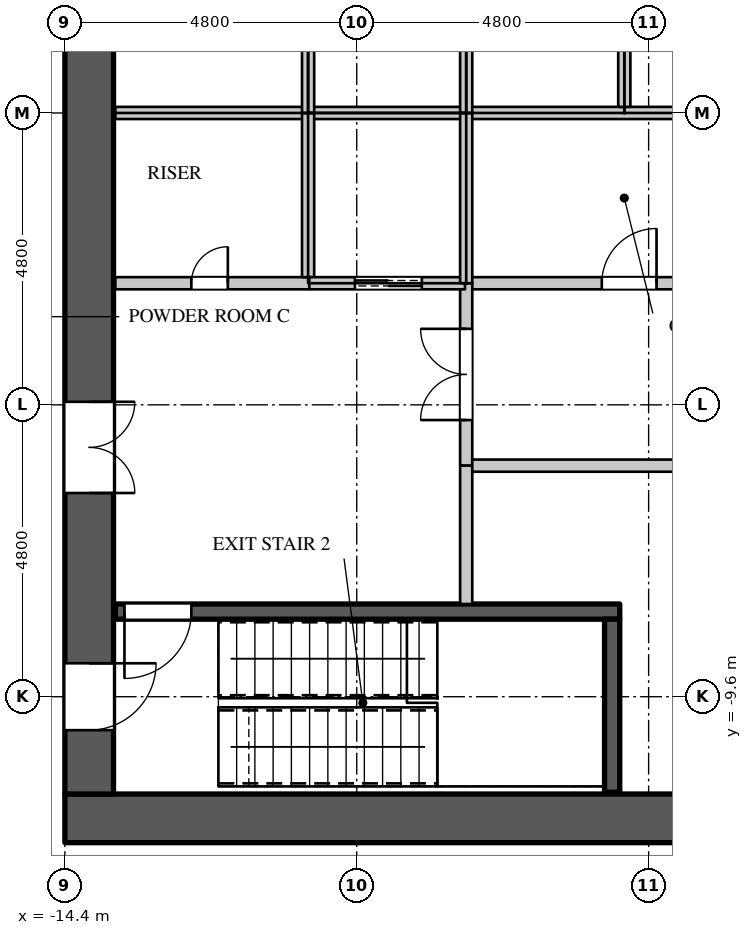
"""IFC4 building model, lengths in metres.
Left out: names, types, materials, properties, quantities, classifications, styles, units other than length and angle.
Written with IfcOpenShell. Run it as: python <this file> out.ifc"""

import sys

from ifc_helpers import new_model, si_unit, direction, frame, frame_2d, origin, place, context, subcontext, project, spatial, rectangle, extrude, element, fill, save


model = new_model("IFC4")
c1 = context("Model", 3, precision=1e-05, world=origin(), true_north=direction((0.0, 1.0)))
c2 = subcontext(c1, "Body", "Model", "MODEL_VIEW")
j1 = project(units=[si_unit("LENGTHUNIT", "METRE"), si_unit("PLANEANGLEUNIT", "RADIAN")], contexts=[c1])
p1 = place(None, origin())
s1 = spatial("IfcSite", under=j1, at=p1, CompositionType="ELEMENT")
p2 = place(p1, origin())
s2 = spatial("IfcBuilding", under=s1, at=p2, CompositionType="ELEMENT")
p3 = place(p2, frame((0.0, 0.0, 148.5)))
s3 = spatial("IfcBuildingStorey", under=s2, at=p3, CompositionType="ELEMENT", Elevation=148.5)
p4 = place(p3, frame((-14.4, -11.6, 0.0), z_axis=(0.0, 0.0, 1.0), x_axis=(1.0, 0.0, 0.0)))
e1 = element("IfcWall", 1, at=p4, inside=s3, PredefinedType="SHEAR", context=c2, shape_type="SweptSolid", body=[
    extrude(rectangle(XDim=28.8, YDim=0.8, at=frame_2d((14.4, 0.0))), origin(), (0.0, 0.0, 1.0), 4.2),
])
p5 = place(p3, frame((-14.0, -11.2, 0.0), z_axis=(0.0, 0.0, 1.0), x_axis=(0.0, 1.0, 0.0)))
e2 = element("IfcWall", 2, at=p5, inside=s3, PredefinedType="SHEAR", context=c2, shape_type="SweptSolid", body=[
    extrude(rectangle(XDim=22.4, YDim=0.8, at=frame_2d((11.2, 0.0))), origin(), (0.0, 0.0, 1.0), 4.2),
])
p6 = place(p5, frame((20.25, 0.0, 0.0)))
e3 = element("IfcOpeningElement", 3, at=p6, cuts=e2, PredefinedType="OPENING", context=c2, shape_type="SweptSolid", body=[
    extrude(rectangle(XDim=1.1, YDim=2.2, at=frame_2d((0.55, 1.1))), frame((0.0, 0.41, 0.0), z_axis=(0.0, -1.0, 0.0), x_axis=(1.0, 0.0, 0.0)), (0.0, 0.0, 1.0), 0.82),
])
p7 = place(p5, frame((1.05, 0.0, 0.0)))
e4 = element("IfcOpeningElement", 4, at=p7, cuts=e2, PredefinedType="OPENING", context=c2, shape_type="SweptSolid", body=[
    extrude(rectangle(XDim=1.1, YDim=2.2, at=frame_2d((0.55, 1.1))), frame((0.0, 0.41, 0.0), z_axis=(0.0, -1.0, 0.0), x_axis=(1.0, 0.0, 0.0)), (0.0, 0.0, 1.0), 0.82),
])
p8 = place(p5, frame((15.95, 0.0, 0.0)))
e5 = element("IfcOpeningElement", 5, at=p8, cuts=e2, PredefinedType="OPENING", context=c2, shape_type="SweptSolid", body=[
    extrude(rectangle(XDim=1.5, YDim=2.4, at=frame_2d((0.75, 1.2))), frame((0.0, 0.41, 0.0), z_axis=(0.0, -1.0, 0.0), x_axis=(1.0, 0.0, 0.0)), (0.0, 0.0, 1.0), 0.82),
])
p9 = place(p5, frame((4.95, 0.0, 0.0)))
e6 = element("IfcOpeningElement", 6, at=p9, cuts=e2, PredefinedType="OPENING", context=c2, shape_type="SweptSolid", body=[
    extrude(rectangle(XDim=1.5, YDim=2.4, at=frame_2d((0.75, 1.2))), frame((0.0, 0.41, 0.0), z_axis=(0.0, -1.0, 0.0), x_axis=(1.0, 0.0, 0.0)), (0.0, 0.0, 1.0), 0.82),
])
p10 = place(p3, frame((-7.82, -2.8, 0.0), z_axis=(0.0, 0.0, 1.0), x_axis=(1.0, 0.0, 0.0)))
e7 = element("IfcWall", 7, at=p10, inside=s3, PredefinedType="PARTITIONING", context=c2, shape_type="SweptSolid", body=[
    extrude(rectangle(XDim=9.64, YDim=0.2, at=frame_2d((4.82, 0.0))), origin(), (0.0, 0.0, 1.0), 3.798),
])
p11 = place(p10, frame((2.25, 0.0, 0.0)))
e8 = element("IfcOpeningElement", 8, at=p11, cuts=e7, PredefinedType="OPENING", context=c2, shape_type="SweptSolid", body=[
    extrude(rectangle(XDim=0.9, YDim=2.2, at=frame_2d((0.45, 1.1))), frame((0.0, 0.11, 0.0), z_axis=(0.0, -1.0, 0.0), x_axis=(1.0, 0.0, 0.0)), (0.0, 0.0, 1.0), 0.22),
])
p12 = place(p10, frame((6.9, 0.0, 0.0)))
e9 = element("IfcOpeningElement", 9, at=p12, cuts=e7, PredefinedType="OPENING", context=c2, shape_type="SweptSolid", body=[
    extrude(rectangle(XDim=0.9, YDim=2.2, at=frame_2d((0.45, 1.1))), frame((0.0, 0.11, 0.0), z_axis=(0.0, -1.0, 0.0), x_axis=(1.0, 0.0, 0.0)), (0.0, 0.0, 1.0), 0.22),
])
p13 = place(p3, frame((-7.8, -5.8, 0.0), z_axis=(0.0, 0.0, 1.0), x_axis=(0.0, 1.0, 0.0)))
e10 = element("IfcWall", 10, at=p13, inside=s3, PredefinedType="PARTITIONING", context=c2, shape_type="SweptSolid", body=[
    extrude(rectangle(XDim=3.0, YDim=0.2, at=frame_2d((1.5, 0.0))), origin(), (0.0, 0.0, 1.0), 3.798),
])
p14 = place(p13, frame((0.75, 0.0, 0.0)))
e11 = element("IfcOpeningElement", 11, at=p14, cuts=e10, PredefinedType="OPENING", context=c2, shape_type="SweptSolid", body=[
    extrude(rectangle(XDim=1.5, YDim=2.4, at=frame_2d((0.75, 1.2))), frame((0.0, 0.11, 0.0), z_axis=(0.0, -1.0, 0.0), x_axis=(1.0, 0.0, 0.0)), (0.0, 0.0, 1.0), 0.22),
])
p15 = place(p3, frame((-13.57, -2.8, 0.0), z_axis=(0.0, 0.0, 1.0), x_axis=(1.0, 0.0, 0.0)))
e12 = element("IfcWall", 12, at=p15, inside=s3, PredefinedType="PARTITIONING", context=c2, shape_type="SweptSolid", body=[
    extrude(rectangle(XDim=3.19, YDim=0.2, at=frame_2d((1.595, 0.0))), origin(), (0.0, 0.0, 1.0), 3.798),
])
p16 = place(p15, frame((1.25, 0.0, 0.0)))
e13 = element("IfcOpeningElement", 13, at=p16, cuts=e12, PredefinedType="OPENING", context=c2, shape_type="SweptSolid", body=[
    extrude(rectangle(XDim=0.6, YDim=2.0, at=frame_2d((0.3, 1.0))), frame((0.0, 0.11, 0.0), z_axis=(0.0, -1.0, 0.0), x_axis=(1.0, 0.0, 0.0)), (0.0, 0.0, 1.0), 0.22),
])
p17 = place(p3, frame((-7.8, -8.075, 0.0), z_axis=(0.0, 0.0, 1.0), x_axis=(0.0, 1.0, 0.0)))
e14 = element("IfcWall", 14, at=p17, inside=s3, PredefinedType="PARTITIONING", context=c2, shape_type="SweptSolid", body=[
    extrude(rectangle(XDim=2.275, YDim=0.2, at=frame_2d((1.137, 0.0))), origin(), (0.0, 0.0, 1.0), 3.798),
])
p18 = place(p3, frame((-7.7, -5.8, 0.0), z_axis=(0.0, 0.0, 1.0), x_axis=(1.0, 0.0, 0.0)))
e15 = element("IfcWall", 15, at=p18, inside=s3, PredefinedType="PARTITIONING", context=c2, shape_type="SweptSolid", body=[
    extrude(rectangle(XDim=11.72, YDim=0.2, at=frame_2d((5.86, 0.0))), origin(), (0.0, 0.0, 1.0), 3.798),
])
p19 = place(p18, frame((5.4, 0.0, 0.0)))
e16 = element("IfcOpeningElement", 16, at=p19, cuts=e15, PredefinedType="OPENING", context=c2, shape_type="SweptSolid", body=[
    extrude(rectangle(XDim=0.9, YDim=2.2, at=frame_2d((0.45, 1.1))), frame((0.0, 0.11, 0.0), z_axis=(0.0, -1.0, 0.0), x_axis=(1.0, 0.0, 0.0)), (0.0, 0.0, 1.0), 0.22),
])
p20 = place(p3, frame((-13.57, 0.0, 0.0), z_axis=(0.0, 0.0, 1.0), x_axis=(1.0, 0.0, 0.0)))
e17 = element("IfcWall", 17, at=p20, inside=s3, PredefinedType="PARTITIONING", context=c2, shape_type="SweptSolid", body=[
    extrude(rectangle(XDim=23.97, YDim=0.2, at=frame_2d((11.985, 0.0))), origin(), (0.0, 0.0, 1.0), 3.798),
])
p21 = place(p3, frame((-10.4, -2.7, 0.0), z_axis=(0.0, 0.0, 1.0), x_axis=(0.0, 1.0, 0.0)))
e18 = element("IfcWall", 18, at=p21, inside=s3, PredefinedType="PARTITIONING", context=c2, shape_type="SweptSolid", body=[
    extrude(rectangle(XDim=2.7, YDim=0.2, at=frame_2d((1.35, 0.0))), origin(), (0.0, 0.0, 1.0), 3.798),
])
p22 = place(p3, frame((-10.38, -2.8, 0.0), z_axis=(0.0, 0.0, 1.0), x_axis=(1.0, 0.0, 0.0)))
e19 = element("IfcWall", 19, at=p22, inside=s3, PredefinedType="PARTITIONING", context=c2, shape_type="SweptSolid", body=[
    extrude(rectangle(XDim=2.56, YDim=0.2, at=frame_2d((1.28, 0.0))), origin(), (0.0, 0.0, 1.0), 3.798),
])
p23 = place(p22, frame((0.75, 0.0, 0.0)))
e20 = element("IfcOpeningElement", 20, at=p23, cuts=e19, PredefinedType="OPENING", context=c2, shape_type="SweptSolid", body=[
    extrude(rectangle(XDim=1.1, YDim=2.2, at=frame_2d((0.55, 1.1))), frame((0.0, 0.11, 0.0), z_axis=(0.0, -1.0, 0.0), x_axis=(1.0, 0.0, 0.0)), (0.0, 0.0, 1.0), 0.22),
])
p24 = place(p3, frame((-10.4, 0.0, 0.0), z_axis=(0.0, 0.0, 1.0), x_axis=(0.0, 1.0, 0.0)))
e21 = element("IfcWall", 21, at=p24, inside=s3, PredefinedType="PARTITIONING", context=c2, shape_type="SweptSolid", body=[
    extrude(rectangle(XDim=2.7, YDim=0.2, at=frame_2d((1.35, 0.0))), origin(), (0.0, 0.0, 1.0), 3.798),
])
for number, where, z_axis, x_axis in (
    (22, (-7.8, -2.8, 0.0), (0.0, 0.0, 1.0), (0.0, 1.0, 0.0)),
    (23, (-7.8, 0.0, 0.0), (0.0, 0.0, 1.0), (0.0, 1.0, 0.0)),
):
    element("IfcWall", number, at=place(p3, frame(where, z_axis=z_axis, x_axis=x_axis)), inside=s3, PredefinedType="PARTITIONING", context=c2, shape_type="SweptSolid", body=[
        extrude(rectangle(XDim=2.8, YDim=0.2, at=frame_2d((1.4, 0.0))), origin(), (0.0, 0.0, 1.0), 3.798),
    ])
p25 = place(p3, frame((-5.2, 0.1, 0.0), z_axis=(0.0, 0.0, 1.0), x_axis=(0.0, 1.0, 0.0)))
e24 = element("IfcWall", 24, at=p25, inside=s3, PredefinedType="PARTITIONING", context=c2, shape_type="SweptSolid", body=[
    extrude(rectangle(XDim=2.6, YDim=0.2, at=frame_2d((1.3, 0.0))), origin(), (0.0, 0.0, 1.0), 3.798),
])
p26 = place(p3, frame((-13.57, -8.2, 0.0), z_axis=(0.0, 0.0, 1.0), x_axis=(1.0, 0.0, 0.0)))
e25 = element("IfcWall", 25, at=p26, inside=s3, PredefinedType="SHEAR", context=c2, shape_type="SweptSolid", body=[
    extrude(rectangle(XDim=8.295, YDim=0.25, at=frame_2d((4.147, 0.0))), origin(), (0.0, 0.0, 1.0), 3.798),
])
p27 = place(p26, frame((0.15, 0.0, 0.0)))
e26 = element("IfcOpeningElement", 26, at=p27, cuts=e25, PredefinedType="OPENING", context=c2, shape_type="SweptSolid", body=[
    extrude(rectangle(XDim=1.1, YDim=2.2, at=frame_2d((0.55, 1.1))), frame((0.0, 0.135, 0.0), z_axis=(0.0, -1.0, 0.0), x_axis=(1.0, 0.0, 0.0)), (0.0, 0.0, 1.0), 0.27),
])
p28 = place(p3, frame((-5.4, -11.17, 0.0), z_axis=(0.0, 0.0, 1.0), x_axis=(0.0, 1.0, 0.0)))
e27 = element("IfcWall", 27, at=p28, inside=s3, PredefinedType="SHEAR", context=c2, shape_type="SweptSolid", body=[
    extrude(rectangle(XDim=2.845, YDim=0.25, at=frame_2d((1.422, 0.0))), origin(), (0.0, 0.0, 1.0), 3.798),
])
p29 = place(p16, origin())
e28 = element("IfcDoor", 28, at=p29, inside=s3, OperationType="SINGLE_SWING_RIGHT", PredefinedType="DOOR", context=c2, shape_type="SweptSolid", body=[
    extrude(rectangle(XDim=0.6, YDim=2.0, at=frame_2d((0.3, 1.0))), frame((0.0, 0.025, 0.0), z_axis=(0.0, -1.0, 0.0), x_axis=(1.0, 0.0, 0.0)), (0.0, 0.0, 1.0), 0.05),
])
fill(e13, e28)
p30 = place(p11, origin())
e29 = element("IfcDoor", 29, at=p30, inside=s3, OperationType="SINGLE_SWING_RIGHT", PredefinedType="DOOR", context=c2, shape_type="SweptSolid", body=[
    extrude(rectangle(XDim=0.9, YDim=2.2, at=frame_2d((0.45, 1.1))), frame((0.0, 0.025, 0.0), z_axis=(0.0, -1.0, 0.0), x_axis=(1.0, 0.0, 0.0)), (0.0, 0.0, 1.0), 0.05),
])
fill(e8, e29)
p31 = place(p23, origin())
e30 = element("IfcDoor", 30, at=p31, inside=s3, OperationType="DOUBLE_DOOR_SLIDING", PredefinedType="DOOR", context=c2, shape_type="SweptSolid", body=[
    extrude(rectangle(XDim=1.1, YDim=2.2, at=frame_2d((0.55, 1.1))), frame((0.0, 0.025, 0.0), z_axis=(0.0, -1.0, 0.0), x_axis=(1.0, 0.0, 0.0)), (0.0, 0.0, 1.0), 0.05),
])
fill(e20, e30)
p32 = place(p27, origin())
e31 = element("IfcDoor", 31, at=p32, inside=s3, OperationType="SINGLE_SWING_RIGHT", PredefinedType="DOOR", context=c2, shape_type="SweptSolid", body=[
    extrude(rectangle(XDim=1.1, YDim=2.2, at=frame_2d((0.55, 1.1))), frame((0.0, 0.025, 0.0), z_axis=(0.0, -1.0, 0.0), x_axis=(1.0, 0.0, 0.0)), (0.0, 0.0, 1.0), 0.05),
])
fill(e26, e31)
p33 = place(p14, origin())
e32 = element("IfcDoor", 32, at=p33, inside=s3, OperationType="DOUBLE_DOOR_SINGLE_SWING", PredefinedType="DOOR", context=c2, shape_type="SweptSolid", body=[
    extrude(rectangle(XDim=1.5, YDim=2.4, at=frame_2d((0.75, 1.2))), frame((0.0, 0.025, 0.0), z_axis=(0.0, -1.0, 0.0), x_axis=(1.0, 0.0, 0.0)), (0.0, 0.0, 1.0), 0.05),
])
fill(e11, e32)
p34 = place(p7, origin())
e33 = element("IfcDoor", 33, at=p34, inside=s3, OperationType="SINGLE_SWING_LEFT", PredefinedType="DOOR", context=c2, shape_type="SweptSolid", body=[
    extrude(rectangle(XDim=1.1, YDim=2.2, at=frame_2d((0.55, 1.1))), frame((0.0, -0.345, 0.0), z_axis=(0.0, -1.0, 0.0), x_axis=(1.0, 0.0, 0.0)), (0.0, 0.0, 1.0), 0.05),
])
fill(e4, e33)
p35 = place(p9, origin())
e34 = element("IfcDoor", 34, at=p35, inside=s3, OperationType="DOUBLE_DOOR_SINGLE_SWING", PredefinedType="DOOR", context=c2, shape_type="SweptSolid", body=[
    extrude(rectangle(XDim=1.5, YDim=2.4, at=frame_2d((0.75, 1.2))), frame((0.0, -0.345, 0.0), z_axis=(0.0, -1.0, 0.0), x_axis=(1.0, 0.0, 0.0)), (0.0, 0.0, 1.0), 0.05),
])
fill(e6, e34)
save(model, sys.argv[1])
